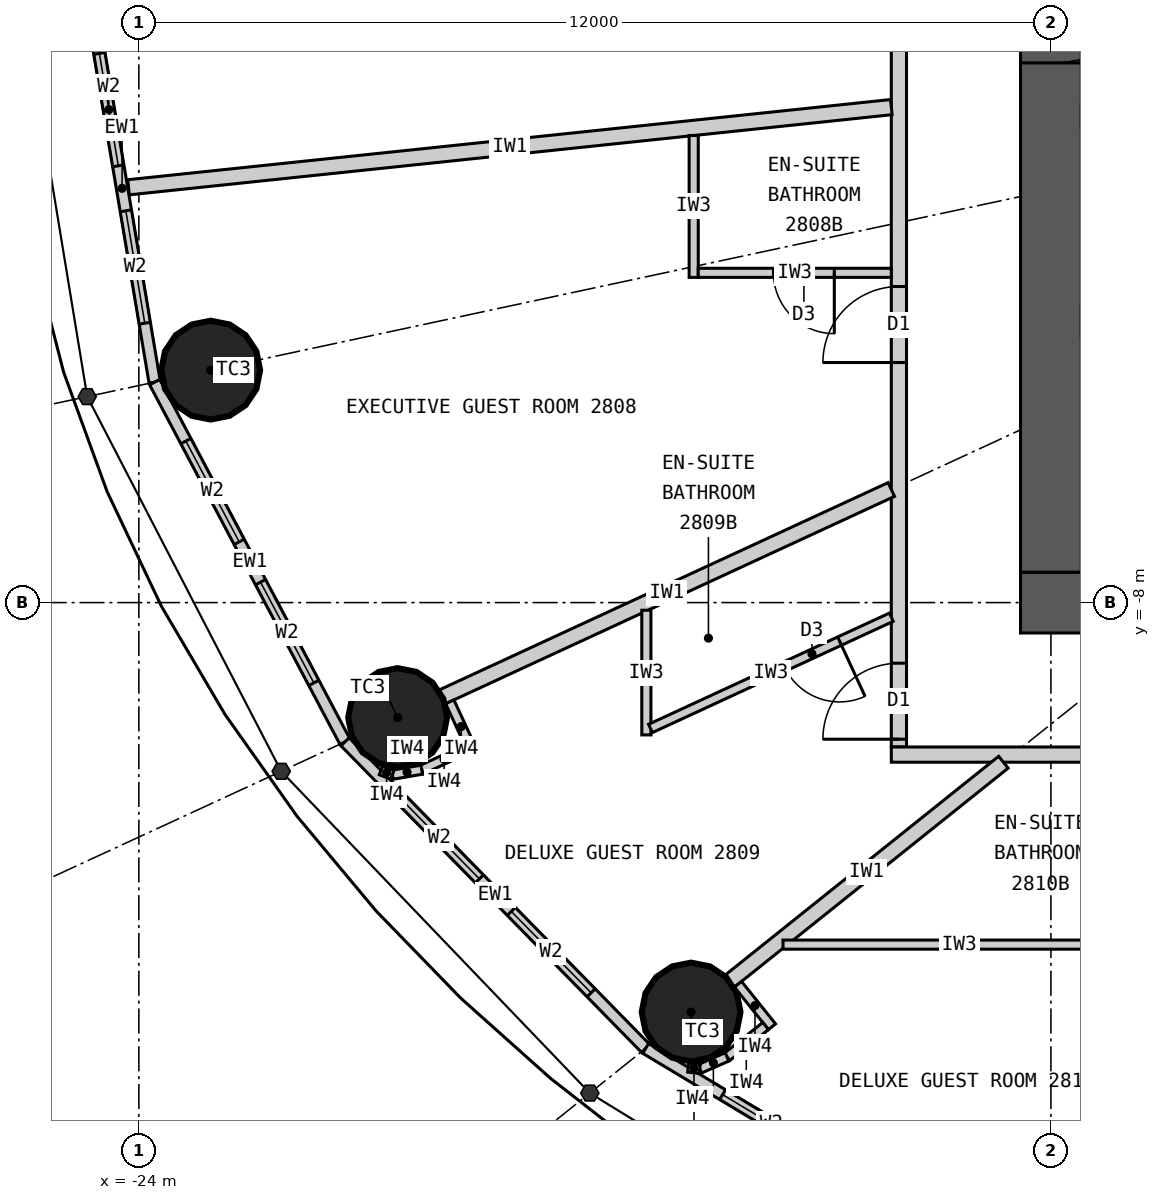
"""IFC4 building model, lengths in metres.
Left out: names, types, materials, properties, quantities, classifications, styles, units other than length and angle.
Written with IfcOpenShell. Run it as: python <this file> out.ifc"""

import sys

from ifc_helpers import new_model, si_unit, direction, frame, frame_2d, origin, origin_2d, place, context, subcontext, project, spatial, rectangle, circle, extrude, element, fill, save


model = new_model("IFC4")
c1 = context("Model", 3, precision=1e-05, world=origin(), true_north=direction((0.0, 1.0)))
c2 = subcontext(c1, "Body", "Model", "MODEL_VIEW")
j1 = project(units=[si_unit("LENGTHUNIT", "METRE"), si_unit("PLANEANGLEUNIT", "RADIAN")], contexts=[c1])
p1 = place(None, origin())
s1 = spatial("IfcSite", under=j1, at=p1, CompositionType="ELEMENT")
p2 = place(p1, origin())
s2 = spatial("IfcBuilding", under=s1, at=p2, CompositionType="ELEMENT")
p3 = place(p2, frame((0.0, 0.0, 112.2)))
s3 = spatial("IfcBuildingStorey", under=s2, at=p3, CompositionType="ELEMENT", Elevation=112.2)
for number, where, z_axis, x_axis in (
    (1, (-23.055, -4.942, 0.0), (0.0, 0.0, 1.0), (1.0, 0.0, 0.0)),
    (2, (-20.596, -9.513, 0.0), (0.0, 0.0, 1.0), (1.0, 0.0, 0.0)),
    (3, (-16.734, -13.387, 0.0), (0.0, 0.0, 1.0), (1.0, 0.0, 0.0)),
):
    element("IfcColumn", number, at=place(p3, frame(where, z_axis=z_axis, x_axis=x_axis)), inside=s3, PredefinedType="COLUMN", context=c2, shape_type="SweptSolid", body=[
        extrude(circle(Radius=0.65, at=origin_2d()), origin(), (0.0, 0.0, 1.0), 3.3),
    ])
p4 = place(p3, frame((12.4, -8.0, 0.0), z_axis=(0.0, 0.0, 1.0), x_axis=(-1.0, 0.0, 0.0)))
e4 = element("IfcWall", 4, at=p4, inside=s3, PredefinedType="SHEAR", context=c2, shape_type="SweptSolid", body=[
    extrude(rectangle(XDim=24.8, YDim=0.8, at=frame_2d((12.4, 0.0))), origin(), (0.0, 0.0, 1.0), 3.3),
])
p5 = place(p4, frame((11.1, 0.0, 0.0)))
e5 = element("IfcOpeningElement", 5, at=p5, cuts=e4, PredefinedType="OPENING", context=c2, shape_type="SweptSolid", body=[
    extrude(rectangle(XDim=1.2, YDim=2.2, at=frame_2d((0.6, 1.1))), frame((0.0, 0.41, 0.0), z_axis=(0.0, -1.0, 0.0), x_axis=(1.0, 0.0, 0.0)), (0.0, 0.0, 1.0), 0.82),
])
p6 = place(p4, frame((18.7, 0.0, 0.0)))
e6 = element("IfcOpeningElement", 6, at=p6, cuts=e4, PredefinedType="OPENING", context=c2, shape_type="SweptSolid", body=[
    extrude(rectangle(XDim=0.9, YDim=2.2, at=frame_2d((0.45, 1.1))), frame((0.0, 0.41, 0.0), z_axis=(0.0, -1.0, 0.0), x_axis=(1.0, 0.0, 0.0)), (0.0, 0.0, 1.0), 0.82),
])
p7 = place(p3, frame((-12.0, 7.6, 0.0), z_axis=(0.0, 0.0, 1.0), x_axis=(0.0, -1.0, 0.0)))
e7 = element("IfcWall", 7, at=p7, inside=s3, PredefinedType="SHEAR", context=c2, shape_type="SweptSolid", body=[
    extrude(rectangle(XDim=15.2, YDim=0.8, at=frame_2d((7.6, 0.0))), origin(), (0.0, 0.0, 1.0), 3.3),
])
p8 = place(p7, frame((6.7, 0.0, 0.0)))
e8 = element("IfcOpeningElement", 8, at=p8, cuts=e7, PredefinedType="OPENING", context=c2, shape_type="SweptSolid", body=[
    extrude(rectangle(XDim=1.8, YDim=2.2, at=frame_2d((0.9, 1.1))), frame((0.0, 0.41, 0.0), z_axis=(0.0, -1.0, 0.0), x_axis=(1.0, 0.0, 0.0)), (0.0, 0.0, 1.0), 0.82),
])
p9 = place(p3, frame((-24.65, 0.0, 0.0), z_axis=(0.0, 0.0, 1.0), x_axis=(0.165883894218, -0.986145290329, 0.0)))
e9 = element("IfcWall", 9, at=p9, inside=s3, PredefinedType="ELEMENTEDWALL", context=c2, shape_type="SweptSolid", body=[
    extrude(rectangle(XDim=5.172, YDim=0.15, at=frame_2d((2.586, 0.0))), origin(), (0.0, 0.0, 1.0), 3.12),
])
p10 = place(p9, frame((0.786, 0.0, 0.9)))
e10 = element("IfcOpeningElement", 10, at=p10, cuts=e9, PredefinedType="OPENING", context=c2, shape_type="SweptSolid", body=[
    extrude(rectangle(XDim=1.5, YDim=1.9, at=frame_2d((0.75, 0.95))), frame((0.0, 0.085, 0.0), z_axis=(0.0, -1.0, 0.0), x_axis=(1.0, 0.0, 0.0)), (0.0, 0.0, 1.0), 0.17),
])
p11 = place(p9, frame((2.886, 0.0, 0.9)))
e11 = element("IfcOpeningElement", 11, at=p11, cuts=e9, PredefinedType="OPENING", context=c2, shape_type="SweptSolid", body=[
    extrude(rectangle(XDim=1.5, YDim=1.9, at=frame_2d((0.75, 0.95))), frame((0.0, 0.085, 0.0), z_axis=(0.0, -1.0, 0.0), x_axis=(1.0, 0.0, 0.0)), (0.0, 0.0, 1.0), 0.17),
])
p12 = place(p3, frame((-23.792, -5.1, 0.0), z_axis=(0.0, 0.0, 1.0), x_axis=(0.467814388454, -0.883826735257, 0.0)))
e12 = element("IfcWall", 12, at=p12, inside=s3, PredefinedType="ELEMENTEDWALL", context=c2, shape_type="SweptSolid", body=[
    extrude(rectangle(XDim=5.354, YDim=0.15, at=frame_2d((2.677, 0.0))), origin(), (0.0, 0.0, 1.0), 3.12),
])
p13 = place(p12, frame((0.877, 0.0, 0.9)))
e13 = element("IfcOpeningElement", 13, at=p13, cuts=e12, PredefinedType="OPENING", context=c2, shape_type="SweptSolid", body=[
    extrude(rectangle(XDim=1.5, YDim=1.9, at=frame_2d((0.75, 0.95))), frame((0.0, 0.085, 0.0), z_axis=(0.0, -1.0, 0.0), x_axis=(1.0, 0.0, 0.0)), (0.0, 0.0, 1.0), 0.17),
])
p14 = place(p12, frame((2.977, 0.0, 0.9)))
e14 = element("IfcOpeningElement", 14, at=p14, cuts=e12, PredefinedType="OPENING", context=c2, shape_type="SweptSolid", body=[
    extrude(rectangle(XDim=1.5, YDim=1.9, at=frame_2d((0.75, 0.95))), frame((0.0, 0.085, 0.0), z_axis=(0.0, -1.0, 0.0), x_axis=(1.0, 0.0, 0.0)), (0.0, 0.0, 1.0), 0.17),
])
p15 = place(p3, frame((-21.287, -9.832, 0.0), z_axis=(0.0, 0.0, 1.0), x_axis=(0.700136650834, -0.714008872605, 0.0)))
e15 = element("IfcWall", 15, at=p15, inside=s3, PredefinedType="ELEMENTEDWALL", context=c2, shape_type="SweptSolid", body=[
    extrude(rectangle(XDim=5.649, YDim=0.15, at=frame_2d((2.825, 0.0))), origin(), (0.0, 0.0, 1.0), 3.12),
])
p16 = place(p15, frame((1.025, 0.0, 0.9)))
e16 = element("IfcOpeningElement", 16, at=p16, cuts=e15, PredefinedType="OPENING", context=c2, shape_type="SweptSolid", body=[
    extrude(rectangle(XDim=1.5, YDim=1.9, at=frame_2d((0.75, 0.95))), frame((0.0, 0.085, 0.0), z_axis=(0.0, -1.0, 0.0), x_axis=(1.0, 0.0, 0.0)), (0.0, 0.0, 1.0), 0.17),
])
p17 = place(p15, frame((3.125, 0.0, 0.9)))
e17 = element("IfcOpeningElement", 17, at=p17, cuts=e15, PredefinedType="OPENING", context=c2, shape_type="SweptSolid", body=[
    extrude(rectangle(XDim=1.5, YDim=1.9, at=frame_2d((0.75, 0.95))), frame((0.0, 0.085, 0.0), z_axis=(0.0, -1.0, 0.0), x_axis=(1.0, 0.0, 0.0)), (0.0, 0.0, 1.0), 0.17),
])
p18 = place(p3, frame((-17.332, -13.866, 0.0), z_axis=(0.0, 0.0, 1.0), x_axis=(0.857308573723, -0.514802884044, 0.0)))
e18 = element("IfcWall", 18, at=p18, inside=s3, PredefinedType="ELEMENTEDWALL", context=c2, shape_type="SweptSolid", body=[
    extrude(rectangle(XDim=5.961, YDim=0.15, at=frame_2d((2.98, 0.0))), origin(), (0.0, 0.0, 1.0), 3.12),
])
p19 = place(p18, frame((1.181, 0.0, 0.9)))
e19 = element("IfcOpeningElement", 19, at=p19, cuts=e18, PredefinedType="OPENING", context=c2, shape_type="SweptSolid", body=[
    extrude(rectangle(XDim=1.5, YDim=1.9, at=frame_2d((0.75, 0.95))), frame((0.0, 0.085, 0.0), z_axis=(0.0, -1.0, 0.0), x_axis=(1.0, 0.0, 0.0)), (0.0, 0.0, 1.0), 0.17),
])
p20 = place(p18, frame((3.281, 0.0, 0.9)))
e20 = element("IfcOpeningElement", 20, at=p20, cuts=e18, PredefinedType="OPENING", context=c2, shape_type="SweptSolid", body=[
    extrude(rectangle(XDim=1.5, YDim=1.9, at=frame_2d((0.75, 0.95))), frame((0.0, 0.085, 0.0), z_axis=(0.0, -1.0, 0.0), x_axis=(1.0, 0.0, 0.0)), (0.0, 0.0, 1.0), 0.17),
])
p21 = place(p3, frame((-14.0, 9.9, 0.0), z_axis=(0.0, 0.0, 1.0), x_axis=(0.0, -1.0, 0.0)))
e21 = element("IfcWall", 21, at=p21, inside=s3, PredefinedType="PARTITIONING", context=c2, shape_type="SweptSolid", body=[
    extrude(rectangle(XDim=19.8, YDim=0.2, at=frame_2d((9.9, 0.0))), origin(), (0.0, 0.0, 1.0), 3.12),
])
p22 = place(p21, frame((3.622, 0.0, 0.0)))
e22 = element("IfcOpeningElement", 22, at=p22, cuts=e21, PredefinedType="OPENING", context=c2, shape_type="SweptSolid", body=[
    extrude(rectangle(XDim=1.0, YDim=2.2, at=frame_2d((0.5, 1.1))), frame((0.0, 0.11, 0.0), z_axis=(0.0, -1.0, 0.0), x_axis=(1.0, 0.0, 0.0)), (0.0, 0.0, 1.0), 0.22),
])
p23 = place(p21, frame((9.238, 0.0, 0.0)))
e23 = element("IfcOpeningElement", 23, at=p23, cuts=e21, PredefinedType="OPENING", context=c2, shape_type="SweptSolid", body=[
    extrude(rectangle(XDim=1.0, YDim=2.2, at=frame_2d((0.5, 1.1))), frame((0.0, 0.11, 0.0), z_axis=(0.0, -1.0, 0.0), x_axis=(1.0, 0.0, 0.0)), (0.0, 0.0, 1.0), 0.22),
])
p24 = place(p21, frame((13.742, 0.0, 0.0)))
e24 = element("IfcOpeningElement", 24, at=p24, cuts=e21, PredefinedType="OPENING", context=c2, shape_type="SweptSolid", body=[
    extrude(rectangle(XDim=1.0, YDim=2.2, at=frame_2d((0.5, 1.1))), frame((0.0, 0.11, 0.0), z_axis=(0.0, -1.0, 0.0), x_axis=(1.0, 0.0, 0.0)), (0.0, 0.0, 1.0), 0.22),
])
p25 = place(p21, frame((18.698, 0.0, 0.0)))
e25 = element("IfcOpeningElement", 25, at=p25, cuts=e21, PredefinedType="OPENING", context=c2, shape_type="SweptSolid", body=[
    extrude(rectangle(XDim=1.0, YDim=2.2, at=frame_2d((0.5, 1.1))), frame((0.0, 0.11, 0.0), z_axis=(0.0, -1.0, 0.0), x_axis=(1.0, 0.0, 0.0)), (0.0, 0.0, 1.0), 0.22),
])
p26 = place(p3, frame((-3.283, -10.0, 0.0), z_axis=(0.0, 0.0, 1.0), x_axis=(-1.0, 0.0, 0.0)))
e26 = element("IfcWall", 26, at=p26, inside=s3, PredefinedType="PARTITIONING", context=c2, shape_type="SweptSolid", body=[
    extrude(rectangle(XDim=10.817, YDim=0.2, at=frame_2d((5.409, 0.0))), origin(), (0.0, 0.0, 1.0), 3.12),
])
p27 = place(p26, frame((6.482, 0.0, 0.0)))
e27 = element("IfcOpeningElement", 27, at=p27, cuts=e26, PredefinedType="OPENING", context=c2, shape_type="SweptSolid", body=[
    extrude(rectangle(XDim=1.0, YDim=2.2, at=frame_2d((0.5, 1.1))), frame((0.0, 0.11, 0.0), z_axis=(0.0, -1.0, 0.0), x_axis=(1.0, 0.0, 0.0)), (0.0, 0.0, 1.0), 0.22),
])
p28 = place(p3, frame((-14.1, -1.482, 0.0), z_axis=(0.0, 0.0, 1.0), x_axis=(-0.994523202615, -0.104516024894, 0.0)))
e28 = element("IfcWall", 28, at=p28, inside=s3, PredefinedType="PARTITIONING", context=c2, shape_type="SweptSolid", body=[
    extrude(rectangle(XDim=10.091, YDim=0.2, at=frame_2d((5.045, 0.0))), origin(), (0.0, 0.0, 1.0), 2.47),
])
p29 = place(p3, frame((-14.1, -6.512, 0.0), z_axis=(0.0, 0.0, 1.0), x_axis=(-0.907833019998, -0.419331858797, 0.0)))
e29 = element("IfcWall", 29, at=p29, inside=s3, PredefinedType="PARTITIONING", context=c2, shape_type="SweptSolid", body=[
    extrude(rectangle(XDim=6.505, YDim=0.2, at=frame_2d((3.252, 0.0))), origin(), (0.0, 0.0, 1.0), 2.27),
])
p30 = place(p3, frame((-12.625, -10.1, 0.0), z_axis=(0.0, 0.0, 1.0), x_axis=(-0.780863644897, -0.624701503182, 0.0)))
e30 = element("IfcWall", 30, at=p30, inside=s3, PredefinedType="PARTITIONING", context=c2, shape_type="SweptSolid", body=[
    extrude(rectangle(XDim=4.612, YDim=0.2, at=frame_2d((2.306, 0.0))), origin(), (0.0, 0.0, 1.0), 2.37),
])
p31 = place(p3, frame((-16.7, -1.855, 0.0), z_axis=(0.0, 0.0, 1.0), x_axis=(0.0, -1.0, 0.0)))
e31 = element("IfcWall", 31, at=p31, inside=s3, PredefinedType="PARTITIONING", context=c2, shape_type="SweptSolid", body=[
    extrude(rectangle(XDim=1.867, YDim=0.12, at=frame_2d((0.933, 0.0))), origin(), (0.0, 0.0, 1.0), 3.12),
])
p32 = place(p3, frame((-14.1, -3.662, 0.0), z_axis=(0.0, 0.0, 1.0), x_axis=(-1.0, 0.0, 0.0)))
e32 = element("IfcWall", 32, at=p32, inside=s3, PredefinedType="PARTITIONING", context=c2, shape_type="SweptSolid", body=[
    extrude(rectangle(XDim=2.54, YDim=0.12, at=frame_2d((1.27, 0.0))), origin(), (0.0, 0.0, 1.0), 2.37),
])
p33 = place(p32, frame((0.75, 0.0, 0.0)))
e33 = element("IfcOpeningElement", 33, at=p33, cuts=e32, PredefinedType="OPENING", context=c2, shape_type="SweptSolid", body=[
    extrude(rectangle(XDim=0.8, YDim=2.1, at=frame_2d((0.4, 1.05))), frame((0.0, 0.07, 0.0), z_axis=(0.0, -1.0, 0.0), x_axis=(1.0, 0.0, 0.0)), (0.0, 0.0, 1.0), 0.14),
])
p34 = place(p3, frame((-17.323, -8.101, 0.0), z_axis=(0.0, 0.0, 1.0), x_axis=(0.0, -1.0, 0.0)))
e34 = element("IfcWall", 34, at=p34, inside=s3, PredefinedType="PARTITIONING", context=c2, shape_type="SweptSolid", body=[
    extrude(rectangle(XDim=1.64, YDim=0.12, at=frame_2d((0.82, 0.0))), origin(), (0.0, 0.0, 1.0), 3.12),
])
p35 = place(p3, frame((-14.1, -8.193, 0.0), z_axis=(0.0, 0.0, 1.0), x_axis=(-0.907836493557, -0.419324338628, 0.0)))
e35 = element("IfcWall", 35, at=p35, inside=s3, PredefinedType="PARTITIONING", context=c2, shape_type="SweptSolid", body=[
    extrude(rectangle(XDim=3.49, YDim=0.12, at=frame_2d((1.745, 0.0))), origin(), (0.0, 0.0, 1.0), 3.12),
])
p36 = place(p35, frame((0.75, 0.0, 0.0)))
e36 = element("IfcOpeningElement", 36, at=p36, cuts=e35, PredefinedType="OPENING", context=c2, shape_type="SweptSolid", body=[
    extrude(rectangle(XDim=0.8, YDim=2.1, at=frame_2d((0.4, 1.05))), frame((0.0, 0.07, 0.0), z_axis=(0.0, -1.0, 0.0), x_axis=(1.0, 0.0, 0.0)), (0.0, 0.0, 1.0), 0.14),
])
p37 = place(p3, frame((-15.525, -12.5, 0.0), z_axis=(0.0, 0.0, 1.0), x_axis=(1.0, 0.0, 0.0)))
e37 = element("IfcWall", 37, at=p37, inside=s3, PredefinedType="PARTITIONING", context=c2, shape_type="SweptSolid", body=[
    extrude(rectangle(XDim=4.64, YDim=0.12, at=frame_2d((2.32, 0.0))), origin(), (0.0, 0.0, 1.0), 3.12),
])
p38 = place(p3, frame((-19.909, -9.306, 0.0), z_axis=(0.0, 0.0, 1.0), x_axis=(0.419296148934, -0.90784951368, 0.0)))
e38 = element("IfcWall", 38, at=p38, inside=s3, PredefinedType="PARTITIONING", context=c2, shape_type="SweptSolid", body=[
    extrude(rectangle(XDim=0.716, YDim=0.12, at=frame_2d((0.358, 0.0))), origin(), (0.0, 0.0, 1.0), 3.12),
])
p39 = place(p3, frame((-19.689, -9.926, 0.0), z_axis=(0.0, 0.0, 1.0), x_axis=(-0.907893409272, -0.419201094227, 0.0)))
e39 = element("IfcWall", 39, at=p39, inside=s3, PredefinedType="PARTITIONING", context=c2, shape_type="SweptSolid", body=[
    extrude(rectangle(XDim=0.65, YDim=0.12, at=frame_2d((0.325, 0.0))), origin(), (0.0, 0.0, 1.0), 3.12),
])
p40 = place(p3, frame((-20.279, -10.199, 0.0), z_axis=(0.0, 0.0, 1.0), x_axis=(-0.985380740712, -0.170366651181, 0.0)))
e40 = element("IfcWall", 40, at=p40, inside=s3, PredefinedType="PARTITIONING", context=c2, shape_type="SweptSolid", body=[
    extrude(rectangle(XDim=0.391, YDim=0.12, at=frame_2d((0.196, 0.0))), origin(), (0.0, 0.0, 1.0), 3.12),
])
p41 = place(p3, frame((-20.664, -10.265, 0.0), z_axis=(0.0, 0.0, 1.0), x_axis=(-0.938058651481, 0.346476501918, 0.0)))
e41 = element("IfcWall", 41, at=p41, inside=s3, PredefinedType="PARTITIONING", context=c2, shape_type="SweptSolid", body=[
    extrude(rectangle(XDim=0.161, YDim=0.12, at=frame_2d((0.081, 0.0))), origin(), (0.0, 0.0, 1.0), 3.12),
])
p42 = place(p3, frame((-16.117, -13.022, 0.0), z_axis=(0.0, 0.0, 1.0), x_axis=(0.62465344249, -0.780902091677, 0.0)))
e42 = element("IfcWall", 42, at=p42, inside=s3, PredefinedType="PARTITIONING", context=c2, shape_type="SweptSolid", body=[
    extrude(rectangle(XDim=0.716, YDim=0.12, at=frame_2d((0.358, 0.0))), origin(), (0.0, 0.0, 1.0), 3.12),
])
p43 = place(p3, frame((-15.754, -13.571, 0.0), z_axis=(0.0, 0.0, 1.0), x_axis=(-0.780905453553, -0.624649239663, 0.0)))
e43 = element("IfcWall", 43, at=p43, inside=s3, PredefinedType="PARTITIONING", context=c2, shape_type="SweptSolid", body=[
    extrude(rectangle(XDim=0.65, YDim=0.12, at=frame_2d((0.325, 0.0))), origin(), (0.0, 0.0, 1.0), 3.12),
])
p44 = place(p3, frame((-16.262, -13.977, 0.0), z_axis=(0.0, 0.0, 1.0), x_axis=(-0.915985403703, -0.401211590314, 0.0)))
e44 = element("IfcWall", 44, at=p44, inside=s3, PredefinedType="PARTITIONING", context=c2, shape_type="SweptSolid", body=[
    extrude(rectangle(XDim=0.391, YDim=0.12, at=frame_2d((0.196, 0.0))), origin(), (0.0, 0.0, 1.0), 3.12),
])
p45 = place(p3, frame((-16.62, -14.134, 0.0), z_axis=(0.0, 0.0, 1.0), x_axis=(-0.993941871493, 0.109907033867, 0.0)))
e45 = element("IfcWall", 45, at=p45, inside=s3, PredefinedType="PARTITIONING", context=c2, shape_type="SweptSolid", body=[
    extrude(rectangle(XDim=0.153, YDim=0.12, at=frame_2d((0.077, 0.0))), origin(), (0.0, 0.0, 1.0), 3.12),
])
p46 = place(p10, origin())
e46 = element("IfcWindow", 46, at=p46, inside=s3, PartitioningType="SINGLE_PANEL", PredefinedType="WINDOW", context=c2, shape_type="SweptSolid", body=[
    extrude(rectangle(XDim=1.5, YDim=1.9, at=frame_2d((0.75, 0.95))), frame((0.0, 0.03, 0.0), z_axis=(0.0, -1.0, 0.0), x_axis=(1.0, 0.0, 0.0)), (0.0, 0.0, 1.0), 0.06),
])
fill(e10, e46)
p47 = place(p11, origin())
e47 = element("IfcWindow", 47, at=p47, inside=s3, PartitioningType="SINGLE_PANEL", PredefinedType="WINDOW", context=c2, shape_type="SweptSolid", body=[
    extrude(rectangle(XDim=1.5, YDim=1.9, at=frame_2d((0.75, 0.95))), frame((0.0, 0.03, 0.0), z_axis=(0.0, -1.0, 0.0), x_axis=(1.0, 0.0, 0.0)), (0.0, 0.0, 1.0), 0.06),
])
fill(e11, e47)
p48 = place(p13, origin())
e48 = element("IfcWindow", 48, at=p48, inside=s3, PartitioningType="SINGLE_PANEL", PredefinedType="WINDOW", context=c2, shape_type="SweptSolid", body=[
    extrude(rectangle(XDim=1.5, YDim=1.9, at=frame_2d((0.75, 0.95))), frame((0.0, 0.03, 0.0), z_axis=(0.0, -1.0, 0.0), x_axis=(1.0, 0.0, 0.0)), (0.0, 0.0, 1.0), 0.06),
])
fill(e13, e48)
p49 = place(p14, origin())
e49 = element("IfcWindow", 49, at=p49, inside=s3, PartitioningType="SINGLE_PANEL", PredefinedType="WINDOW", context=c2, shape_type="SweptSolid", body=[
    extrude(rectangle(XDim=1.5, YDim=1.9, at=frame_2d((0.75, 0.95))), frame((0.0, 0.03, 0.0), z_axis=(0.0, -1.0, 0.0), x_axis=(1.0, 0.0, 0.0)), (0.0, 0.0, 1.0), 0.06),
])
fill(e14, e49)
p50 = place(p16, origin())
e50 = element("IfcWindow", 50, at=p50, inside=s3, PartitioningType="SINGLE_PANEL", PredefinedType="WINDOW", context=c2, shape_type="SweptSolid", body=[
    extrude(rectangle(XDim=1.5, YDim=1.9, at=frame_2d((0.75, 0.95))), frame((0.0, 0.03, 0.0), z_axis=(0.0, -1.0, 0.0), x_axis=(1.0, 0.0, 0.0)), (0.0, 0.0, 1.0), 0.06),
])
fill(e16, e50)
p51 = place(p17, origin())
e51 = element("IfcWindow", 51, at=p51, inside=s3, PartitioningType="SINGLE_PANEL", PredefinedType="WINDOW", context=c2, shape_type="SweptSolid", body=[
    extrude(rectangle(XDim=1.5, YDim=1.9, at=frame_2d((0.75, 0.95))), frame((0.0, 0.03, 0.0), z_axis=(0.0, -1.0, 0.0), x_axis=(1.0, 0.0, 0.0)), (0.0, 0.0, 1.0), 0.06),
])
fill(e17, e51)
p52 = place(p19, origin())
e52 = element("IfcWindow", 52, at=p52, inside=s3, PartitioningType="SINGLE_PANEL", PredefinedType="WINDOW", context=c2, shape_type="SweptSolid", body=[
    extrude(rectangle(XDim=1.5, YDim=1.9, at=frame_2d((0.75, 0.95))), frame((0.0, 0.03, 0.0), z_axis=(0.0, -1.0, 0.0), x_axis=(1.0, 0.0, 0.0)), (0.0, 0.0, 1.0), 0.06),
])
fill(e19, e52)
p53 = place(p33, origin())
e53 = element("IfcDoor", 53, at=p53, inside=s3, OperationType="SINGLE_SWING_LEFT", PredefinedType="DOOR", context=c2, shape_type="SweptSolid", body=[
    extrude(rectangle(XDim=0.8, YDim=2.1, at=frame_2d((0.4, 1.05))), frame((0.0, 0.025, 0.0), z_axis=(0.0, -1.0, 0.0), x_axis=(1.0, 0.0, 0.0)), (0.0, 0.0, 1.0), 0.05),
])
fill(e33, e53)
p54 = place(p24, origin())
e54 = element("IfcDoor", 54, at=p54, inside=s3, OperationType="SINGLE_SWING_RIGHT", PredefinedType="DOOR", context=c2, shape_type="SweptSolid", body=[
    extrude(rectangle(XDim=1.0, YDim=2.2, at=frame_2d((0.5, 1.1))), frame((0.0, 0.025, 0.0), z_axis=(0.0, -1.0, 0.0), x_axis=(1.0, 0.0, 0.0)), (0.0, 0.0, 1.0), 0.05),
])
fill(e24, e54)
p55 = place(p36, origin())
e55 = element("IfcDoor", 55, at=p55, inside=s3, OperationType="SINGLE_SWING_LEFT", PredefinedType="DOOR", context=c2, shape_type="SweptSolid", body=[
    extrude(rectangle(XDim=0.8, YDim=2.1, at=frame_2d((0.4, 1.05))), frame((0.0, 0.025, 0.0), z_axis=(0.0, -1.0, 0.0), x_axis=(1.0, 0.0, 0.0)), (0.0, 0.0, 1.0), 0.05),
])
fill(e36, e55)
p56 = place(p25, origin())
e56 = element("IfcDoor", 56, at=p56, inside=s3, OperationType="SINGLE_SWING_RIGHT", PredefinedType="DOOR", context=c2, shape_type="SweptSolid", body=[
    extrude(rectangle(XDim=1.0, YDim=2.2, at=frame_2d((0.5, 1.1))), frame((0.0, 0.025, 0.0), z_axis=(0.0, -1.0, 0.0), x_axis=(1.0, 0.0, 0.0)), (0.0, 0.0, 1.0), 0.05),
])
fill(e25, e56)
p57 = place(p8, origin())
e57 = element("IfcDoor", 57, at=p57, inside=s3, OperationType="DOUBLE_DOOR_DOUBLE_SWING", PredefinedType="DOOR", context=c2, shape_type="SweptSolid", body=[
    extrude(rectangle(XDim=1.8, YDim=2.2, at=frame_2d((0.9, 1.1))), frame((0.0, 0.025, 0.0), z_axis=(0.0, -1.0, 0.0), x_axis=(1.0, 0.0, 0.0)), (0.0, 0.0, 1.0), 0.05),
])
fill(e8, e57)
save(model, sys.argv[1])
